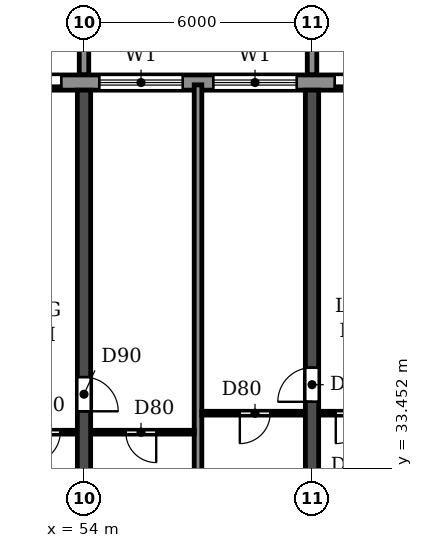
"""IFC4 building model, lengths in metres.
Left out: names, types, materials, properties, quantities, classifications, styles, units other than length and angle.
Written with IfcOpenShell. Run it as: python <this file> out.ifc"""

import sys

from ifc_helpers import new_model, si_unit, direction, frame, frame_2d, origin, place, context, subcontext, project, spatial, polyline, rectangle, outline, extrude, source, transform, mapped, element, fill, save


model = new_model("IFC4")
c1 = context("Model", 3, precision=1e-05, world=origin(), true_north=direction((0.0, 1.0)))
c2 = subcontext(c1, "Body", "Model", "MODEL_VIEW")
j1 = project(units=[si_unit("LENGTHUNIT", "METRE"), si_unit("PLANEANGLEUNIT", "RADIAN")], contexts=[c1])
p1 = place(None, origin())
s1 = spatial("IfcSite", under=j1, at=p1, CompositionType="ELEMENT")
p2 = place(p1, origin())
s2 = spatial("IfcBuilding", under=s1, at=p2, CompositionType="ELEMENT")
p3 = place(p2, frame((0.0, 0.0, 82.8)))
s3 = spatial("IfcBuildingStorey", under=s2, at=p3, CompositionType="ELEMENT", Elevation=82.8)
p4 = place(p3, frame((54.0, 30.525, 0.0), z_axis=(0.0, 0.0, 1.0), x_axis=(0.0, 1.0, 0.0)))
e1 = element("IfcWall", 1, at=p4, inside=s3, PredefinedType="SHEAR", context=c2, shape_type="SweptSolid", body=[
    extrude(rectangle(XDim=12.875, YDim=0.35, at=frame_2d((6.438, 0.0))), origin(), (0.0, 0.0, 1.0), 3.06),
])
p5 = place(p4, frame((4.425, 0.0, 0.0)))
e2 = element("IfcOpeningElement", 2, at=p5, cuts=e1, PredefinedType="OPENING", context=c2, shape_type="SweptSolid", body=[
    extrude(rectangle(XDim=0.9, YDim=2.1, at=frame_2d((0.45, 1.05))), frame((0.0, 0.185, 0.0), z_axis=(0.0, -1.0, 0.0), x_axis=(1.0, 0.0, 0.0)), (0.0, 0.0, 1.0), 0.37),
])
p6 = place(p3, frame((60.0, 30.525, 0.0), z_axis=(0.0, 0.0, 1.0), x_axis=(0.0, 1.0, 0.0)))
e3 = element("IfcWall", 3, at=p6, inside=s3, PredefinedType="SHEAR", context=c2, shape_type="SweptSolid", body=[
    extrude(rectangle(XDim=12.875, YDim=0.35, at=frame_2d((6.438, 0.0))), origin(), (0.0, 0.0, 1.0), 3.06),
])
p7 = place(p6, frame((4.675, 0.0, 0.0)))
e4 = element("IfcOpeningElement", 4, at=p7, cuts=e3, PredefinedType="OPENING", context=c2, shape_type="SweptSolid", body=[
    extrude(rectangle(XDim=0.9, YDim=2.1, at=frame_2d((0.45, 1.05))), frame((0.0, 0.185, 0.0), z_axis=(0.0, -1.0, 0.0), x_axis=(1.0, 0.0, 0.0)), (0.0, 0.0, 1.0), 0.37),
])
p8 = place(p3, frame((91.317, 43.6, 0.0), z_axis=(0.0, 0.0, 1.0), x_axis=(-1.0, 0.0, 0.0)))
e5 = element("IfcWall", 5, at=p8, inside=s3, PredefinedType="STANDARD", context=c2, shape_type="SweptSolid", body=[
    extrude(rectangle(XDim=80.634, YDim=0.4, at=frame_2d((40.317, 0.0))), origin(), (0.0, 0.0, 1.0), 3.06),
])
p9 = place(p8, frame((76.717, 0.0, 0.9)))
e6 = element("IfcOpeningElement", 6, at=p9, cuts=e5, PredefinedType="OPENING", context=c2, shape_type="SweptSolid", body=[
    extrude(rectangle(XDim=2.2, YDim=1.5, at=frame_2d((1.1, 0.75))), frame((0.0, 0.21, 0.0), z_axis=(0.0, -1.0, 0.0), x_axis=(1.0, 0.0, 0.0)), (0.0, 0.0, 1.0), 0.42),
])
p10 = place(p8, frame((73.917, 0.0, 0.0)))
e7 = element("IfcOpeningElement", 7, at=p10, cuts=e5, PredefinedType="OPENING", context=c2, shape_type="SweptSolid", body=[
    extrude(rectangle(XDim=1.8, YDim=2.4, at=frame_2d((0.9, 1.2))), frame((0.0, 0.21, 0.0), z_axis=(0.0, -1.0, 0.0), x_axis=(1.0, 0.0, 0.0)), (0.0, 0.0, 1.0), 0.42),
])
p11 = place(p8, frame((70.717, 0.0, 0.9)))
e8 = element("IfcOpeningElement", 8, at=p11, cuts=e5, PredefinedType="OPENING", context=c2, shape_type="SweptSolid", body=[
    extrude(rectangle(XDim=2.2, YDim=1.5, at=frame_2d((1.1, 0.75))), frame((0.0, 0.21, 0.0), z_axis=(0.0, -1.0, 0.0), x_axis=(1.0, 0.0, 0.0)), (0.0, 0.0, 1.0), 0.42),
])
p12 = place(p8, frame((67.717, 0.0, 0.9)))
e9 = element("IfcOpeningElement", 9, at=p12, cuts=e5, PredefinedType="OPENING", context=c2, shape_type="SweptSolid", body=[
    extrude(rectangle(XDim=2.2, YDim=1.5, at=frame_2d((1.1, 0.75))), frame((0.0, 0.21, 0.0), z_axis=(0.0, -1.0, 0.0), x_axis=(1.0, 0.0, 0.0)), (0.0, 0.0, 1.0), 0.42),
])
p13 = place(p8, frame((64.717, 0.0, 0.9)))
e10 = element("IfcOpeningElement", 10, at=p13, cuts=e5, PredefinedType="OPENING", context=c2, shape_type="SweptSolid", body=[
    extrude(rectangle(XDim=2.2, YDim=1.5, at=frame_2d((1.1, 0.75))), frame((0.0, 0.21, 0.0), z_axis=(0.0, -1.0, 0.0), x_axis=(1.0, 0.0, 0.0)), (0.0, 0.0, 1.0), 0.42),
])
p14 = place(p8, frame((61.917, 0.0, 0.0)))
e11 = element("IfcOpeningElement", 11, at=p14, cuts=e5, PredefinedType="OPENING", context=c2, shape_type="SweptSolid", body=[
    extrude(rectangle(XDim=1.8, YDim=2.4, at=frame_2d((0.9, 1.2))), frame((0.0, 0.21, 0.0), z_axis=(0.0, -1.0, 0.0), x_axis=(1.0, 0.0, 0.0)), (0.0, 0.0, 1.0), 0.42),
])
p15 = place(p8, frame((58.917, 0.0, 0.0)))
e12 = element("IfcOpeningElement", 12, at=p15, cuts=e5, PredefinedType="OPENING", context=c2, shape_type="SweptSolid", body=[
    extrude(rectangle(XDim=1.8, YDim=2.4, at=frame_2d((0.9, 1.2))), frame((0.0, 0.21, 0.0), z_axis=(0.0, -1.0, 0.0), x_axis=(1.0, 0.0, 0.0)), (0.0, 0.0, 1.0), 0.42),
])
p16 = place(p8, frame((55.717, 0.0, 0.9)))
e13 = element("IfcOpeningElement", 13, at=p16, cuts=e5, PredefinedType="OPENING", context=c2, shape_type="SweptSolid", body=[
    extrude(rectangle(XDim=2.2, YDim=1.5, at=frame_2d((1.1, 0.75))), frame((0.0, 0.21, 0.0), z_axis=(0.0, -1.0, 0.0), x_axis=(1.0, 0.0, 0.0)), (0.0, 0.0, 1.0), 0.42),
])
p17 = place(p8, frame((52.717, 0.0, 0.9)))
e14 = element("IfcOpeningElement", 14, at=p17, cuts=e5, PredefinedType="OPENING", context=c2, shape_type="SweptSolid", body=[
    extrude(rectangle(XDim=2.2, YDim=1.5, at=frame_2d((1.1, 0.75))), frame((0.0, 0.21, 0.0), z_axis=(0.0, -1.0, 0.0), x_axis=(1.0, 0.0, 0.0)), (0.0, 0.0, 1.0), 0.42),
])
p18 = place(p8, frame((49.917, 0.0, 0.0)))
e15 = element("IfcOpeningElement", 15, at=p18, cuts=e5, PredefinedType="OPENING", context=c2, shape_type="SweptSolid", body=[
    extrude(rectangle(XDim=1.8, YDim=2.4, at=frame_2d((0.9, 1.2))), frame((0.0, 0.21, 0.0), z_axis=(0.0, -1.0, 0.0), x_axis=(1.0, 0.0, 0.0)), (0.0, 0.0, 1.0), 0.42),
])
p19 = place(p8, frame((46.717, 0.0, 0.9)))
e16 = element("IfcOpeningElement", 16, at=p19, cuts=e5, PredefinedType="OPENING", context=c2, shape_type="SweptSolid", body=[
    extrude(rectangle(XDim=2.2, YDim=1.5, at=frame_2d((1.1, 0.75))), frame((0.0, 0.21, 0.0), z_axis=(0.0, -1.0, 0.0), x_axis=(1.0, 0.0, 0.0)), (0.0, 0.0, 1.0), 0.42),
])
p20 = place(p8, frame((43.717, 0.0, 0.9)))
e17 = element("IfcOpeningElement", 17, at=p20, cuts=e5, PredefinedType="OPENING", context=c2, shape_type="SweptSolid", body=[
    extrude(rectangle(XDim=2.2, YDim=1.5, at=frame_2d((1.1, 0.75))), frame((0.0, 0.21, 0.0), z_axis=(0.0, -1.0, 0.0), x_axis=(1.0, 0.0, 0.0)), (0.0, 0.0, 1.0), 0.42),
])
p21 = place(p8, frame((40.717, 0.0, 0.9)))
e18 = element("IfcOpeningElement", 18, at=p21, cuts=e5, PredefinedType="OPENING", context=c2, shape_type="SweptSolid", body=[
    extrude(rectangle(XDim=2.2, YDim=1.5, at=frame_2d((1.1, 0.75))), frame((0.0, 0.21, 0.0), z_axis=(0.0, -1.0, 0.0), x_axis=(1.0, 0.0, 0.0)), (0.0, 0.0, 1.0), 0.42),
])
p22 = place(p8, frame((37.917, 0.0, 0.0)))
e19 = element("IfcOpeningElement", 19, at=p22, cuts=e5, PredefinedType="OPENING", context=c2, shape_type="SweptSolid", body=[
    extrude(rectangle(XDim=1.8, YDim=2.4, at=frame_2d((0.9, 1.2))), frame((0.0, 0.21, 0.0), z_axis=(0.0, -1.0, 0.0), x_axis=(1.0, 0.0, 0.0)), (0.0, 0.0, 1.0), 0.42),
])
p23 = place(p8, frame((34.717, 0.0, 0.9)))
e20 = element("IfcOpeningElement", 20, at=p23, cuts=e5, PredefinedType="OPENING", context=c2, shape_type="SweptSolid", body=[
    extrude(rectangle(XDim=2.2, YDim=1.5, at=frame_2d((1.1, 0.75))), frame((0.0, 0.21, 0.0), z_axis=(0.0, -1.0, 0.0), x_axis=(1.0, 0.0, 0.0)), (0.0, 0.0, 1.0), 0.42),
])
p24 = place(p8, frame((31.717, 0.0, 0.9)))
e21 = element("IfcOpeningElement", 21, at=p24, cuts=e5, PredefinedType="OPENING", context=c2, shape_type="SweptSolid", body=[
    extrude(rectangle(XDim=2.2, YDim=1.5, at=frame_2d((1.1, 0.75))), frame((0.0, 0.21, 0.0), z_axis=(0.0, -1.0, 0.0), x_axis=(1.0, 0.0, 0.0)), (0.0, 0.0, 1.0), 0.42),
])
p25 = place(p8, frame((28.917, 0.0, 0.0)))
e22 = element("IfcOpeningElement", 22, at=p25, cuts=e5, PredefinedType="OPENING", context=c2, shape_type="SweptSolid", body=[
    extrude(rectangle(XDim=1.8, YDim=2.4, at=frame_2d((0.9, 1.2))), frame((0.0, 0.21, 0.0), z_axis=(0.0, -1.0, 0.0), x_axis=(1.0, 0.0, 0.0)), (0.0, 0.0, 1.0), 0.42),
])
p26 = place(p8, frame((25.717, 0.0, 0.9)))
e23 = element("IfcOpeningElement", 23, at=p26, cuts=e5, PredefinedType="OPENING", context=c2, shape_type="SweptSolid", body=[
    extrude(rectangle(XDim=2.2, YDim=1.5, at=frame_2d((1.1, 0.75))), frame((0.0, 0.21, 0.0), z_axis=(0.0, -1.0, 0.0), x_axis=(1.0, 0.0, 0.0)), (0.0, 0.0, 1.0), 0.42),
])
p27 = place(p8, frame((22.717, 0.0, 0.9)))
e24 = element("IfcOpeningElement", 24, at=p27, cuts=e5, PredefinedType="OPENING", context=c2, shape_type="SweptSolid", body=[
    extrude(rectangle(XDim=2.2, YDim=1.5, at=frame_2d((1.1, 0.75))), frame((0.0, 0.21, 0.0), z_axis=(0.0, -1.0, 0.0), x_axis=(1.0, 0.0, 0.0)), (0.0, 0.0, 1.0), 0.42),
])
p28 = place(p8, frame((19.717, 0.0, 0.9)))
e25 = element("IfcOpeningElement", 25, at=p28, cuts=e5, PredefinedType="OPENING", context=c2, shape_type="SweptSolid", body=[
    extrude(rectangle(XDim=2.2, YDim=1.5, at=frame_2d((1.1, 0.75))), frame((0.0, 0.21, 0.0), z_axis=(0.0, -1.0, 0.0), x_axis=(1.0, 0.0, 0.0)), (0.0, 0.0, 1.0), 0.42),
])
p29 = place(p8, frame((16.717, 0.0, 0.9)))
e26 = element("IfcOpeningElement", 26, at=p29, cuts=e5, PredefinedType="OPENING", context=c2, shape_type="SweptSolid", body=[
    extrude(rectangle(XDim=2.2, YDim=1.5, at=frame_2d((1.1, 0.75))), frame((0.0, 0.21, 0.0), z_axis=(0.0, -1.0, 0.0), x_axis=(1.0, 0.0, 0.0)), (0.0, 0.0, 1.0), 0.42),
])
p30 = place(p8, frame((13.917, 0.0, 0.0)))
e27 = element("IfcOpeningElement", 27, at=p30, cuts=e5, PredefinedType="OPENING", context=c2, shape_type="SweptSolid", body=[
    extrude(rectangle(XDim=1.8, YDim=2.4, at=frame_2d((0.9, 1.2))), frame((0.0, 0.21, 0.0), z_axis=(0.0, -1.0, 0.0), x_axis=(1.0, 0.0, 0.0)), (0.0, 0.0, 1.0), 0.42),
])
p31 = place(p8, frame((10.717, 0.0, 0.9)))
e28 = element("IfcOpeningElement", 28, at=p31, cuts=e5, PredefinedType="OPENING", context=c2, shape_type="SweptSolid", body=[
    extrude(rectangle(XDim=2.2, YDim=1.5, at=frame_2d((1.1, 0.75))), frame((0.0, 0.21, 0.0), z_axis=(0.0, -1.0, 0.0), x_axis=(1.0, 0.0, 0.0)), (0.0, 0.0, 1.0), 0.42),
])
p32 = place(p8, frame((7.717, 0.0, 0.9)))
e29 = element("IfcOpeningElement", 29, at=p32, cuts=e5, PredefinedType="OPENING", context=c2, shape_type="SweptSolid", body=[
    extrude(rectangle(XDim=2.2, YDim=1.5, at=frame_2d((1.1, 0.75))), frame((0.0, 0.21, 0.0), z_axis=(0.0, -1.0, 0.0), x_axis=(1.0, 0.0, 0.0)), (0.0, 0.0, 1.0), 0.42),
])
p33 = place(p8, frame((4.917, 0.0, 0.0)))
e30 = element("IfcOpeningElement", 30, at=p33, cuts=e5, PredefinedType="OPENING", context=c2, shape_type="SweptSolid", body=[
    extrude(rectangle(XDim=1.8, YDim=2.4, at=frame_2d((0.9, 1.2))), frame((0.0, 0.21, 0.0), z_axis=(0.0, -1.0, 0.0), x_axis=(1.0, 0.0, 0.0)), (0.0, 0.0, 1.0), 0.42),
])
p34 = place(p8, frame((1.717, 0.0, 0.9)))
e31 = element("IfcOpeningElement", 31, at=p34, cuts=e5, PredefinedType="OPENING", context=c2, shape_type="SweptSolid", body=[
    extrude(rectangle(XDim=2.2, YDim=1.5, at=frame_2d((1.1, 0.75))), frame((0.0, 0.21, 0.0), z_axis=(0.0, -1.0, 0.0), x_axis=(1.0, 0.0, 0.0)), (0.0, 0.0, 1.0), 0.42),
])
m1 = source(origin(), c2, "Body", "SweptSolid", [
    extrude(outline(polyline([(0.0, 0.0), (0.25, 0.0), (0.25, 3.1), (0.0, 3.1), (0.0, 0.0)])), origin(), (0.0, 0.0, 1.0), 3.1),
])
for number, where in (
    (32, (53.875, 43.8, 0.0)),
    (33, (59.875, 43.8, 0.0)),
):
    element("IfcWall", number, at=place(p3, frame(where)), inside=s3, PredefinedType="STANDARD", context=c2, shape_type="MappedRepresentation", body=[
        mapped(m1, transform((0.0, 0.0, 0.0))),
    ])
p35 = place(p3, frame((57.0, 30.535, 0.0), z_axis=(0.0, 0.0, 1.0), x_axis=(0.0, 1.0, 0.0)))
e34 = element("IfcWall", 34, at=p35, inside=s3, PredefinedType="PARTITIONING", context=c2, shape_type="SweptSolid", body=[
    extrude(rectangle(XDim=13.005, YDim=0.2, at=frame_2d((6.502, 0.0))), origin(), (0.0, 0.0, 1.0), 3.06),
])
p36 = place(p3, frame((51.9, 34.4, 0.0), z_axis=(0.0, 0.0, 1.0), x_axis=(1.0, 0.0, 0.0)))
e35 = element("IfcWall", 35, at=p36, inside=s3, PredefinedType="PARTITIONING", context=c2, shape_type="SweptSolid", body=[
    extrude(rectangle(XDim=1.915, YDim=0.1, at=frame_2d((0.958, 0.0))), origin(), (0.0, 0.0, 1.0), 3.06),
])
p37 = place(p36, frame((0.675, 0.0, 0.0)))
e36 = element("IfcOpeningElement", 36, at=p37, cuts=e35, PredefinedType="OPENING", context=c2, shape_type="SweptSolid", body=[
    extrude(rectangle(XDim=0.8, YDim=2.1, at=frame_2d((0.4, 1.05))), frame((0.0, 0.06, 0.0), z_axis=(0.0, -1.0, 0.0), x_axis=(1.0, 0.0, 0.0)), (0.0, 0.0, 1.0), 0.12),
])
p38 = place(p3, frame((54.185, 34.4, 0.0), z_axis=(0.0, 0.0, 1.0), x_axis=(1.0, 0.0, 0.0)))
e37 = element("IfcWall", 37, at=p38, inside=s3, PredefinedType="PARTITIONING", context=c2, shape_type="SweptSolid", body=[
    extrude(rectangle(XDim=2.715, YDim=0.1, at=frame_2d((1.357, 0.0))), origin(), (0.0, 0.0, 1.0), 3.06),
])
p39 = place(p38, frame((0.915, 0.0, 0.0)))
e38 = element("IfcOpeningElement", 38, at=p39, cuts=e37, PredefinedType="OPENING", context=c2, shape_type="SweptSolid", body=[
    extrude(rectangle(XDim=0.8, YDim=2.1, at=frame_2d((0.4, 1.05))), frame((0.0, 0.06, 0.0), z_axis=(0.0, -1.0, 0.0), x_axis=(1.0, 0.0, 0.0)), (0.0, 0.0, 1.0), 0.12),
])
p40 = place(p3, frame((57.1, 34.9, 0.0), z_axis=(0.0, 0.0, 1.0), x_axis=(1.0, 0.0, 0.0)))
e39 = element("IfcWall", 39, at=p40, inside=s3, PredefinedType="PARTITIONING", context=c2, shape_type="SweptSolid", body=[
    extrude(rectangle(XDim=2.715, YDim=0.1, at=frame_2d((1.357, 0.0))), origin(), (0.0, 0.0, 1.0), 3.06),
])
p41 = place(p40, frame((1.0, 0.0, 0.0)))
e40 = element("IfcOpeningElement", 40, at=p41, cuts=e39, PredefinedType="OPENING", context=c2, shape_type="SweptSolid", body=[
    extrude(rectangle(XDim=0.8, YDim=2.1, at=frame_2d((0.4, 1.05))), frame((0.0, 0.06, 0.0), z_axis=(0.0, -1.0, 0.0), x_axis=(1.0, 0.0, 0.0)), (0.0, 0.0, 1.0), 0.12),
])
p42 = place(p3, frame((60.185, 34.9, 0.0), z_axis=(0.0, 0.0, 1.0), x_axis=(1.0, 0.0, 0.0)))
e41 = element("IfcWall", 41, at=p42, inside=s3, PredefinedType="PARTITIONING", context=c2, shape_type="SweptSolid", body=[
    extrude(rectangle(XDim=1.915, YDim=0.1, at=frame_2d((0.958, 0.0))), origin(), (0.0, 0.0, 1.0), 3.06),
])
p43 = place(p42, frame((0.44, 0.0, 0.0)))
e42 = element("IfcOpeningElement", 42, at=p43, cuts=e41, PredefinedType="OPENING", context=c2, shape_type="SweptSolid", body=[
    extrude(rectangle(XDim=0.8, YDim=2.1, at=frame_2d((0.4, 1.05))), frame((0.0, 0.06, 0.0), z_axis=(0.0, -1.0, 0.0), x_axis=(1.0, 0.0, 0.0)), (0.0, 0.0, 1.0), 0.12),
])
p44 = place(p22, origin())
e43 = element("IfcDoor", 43, at=p44, inside=s3, OperationType="DOUBLE_DOOR_SLIDING", PredefinedType="DOOR", context=c2, shape_type="SweptSolid", body=[
    extrude(rectangle(XDim=1.8, YDim=2.4, at=frame_2d((0.9, 1.2))), frame((0.0, 0.025, 0.0), z_axis=(0.0, -1.0, 0.0), x_axis=(1.0, 0.0, 0.0)), (0.0, 0.0, 1.0), 0.05),
])
fill(e19, e43)
p45 = place(p23, origin())
e44 = element("IfcWindow", 44, at=p45, inside=s3, PartitioningType="DOUBLE_PANEL_HORIZONTAL", PredefinedType="WINDOW", context=c2, shape_type="SweptSolid", body=[
    extrude(rectangle(XDim=2.2, YDim=1.5, at=frame_2d((1.1, 0.75))), frame((0.0, 0.03, 0.0), z_axis=(0.0, -1.0, 0.0), x_axis=(1.0, 0.0, 0.0)), (0.0, 0.0, 1.0), 0.06),
])
fill(e20, e44)
p46 = place(p24, origin())
e45 = element("IfcWindow", 45, at=p46, inside=s3, PartitioningType="DOUBLE_PANEL_HORIZONTAL", PredefinedType="WINDOW", context=c2, shape_type="SweptSolid", body=[
    extrude(rectangle(XDim=2.2, YDim=1.5, at=frame_2d((1.1, 0.75))), frame((0.0, 0.03, 0.0), z_axis=(0.0, -1.0, 0.0), x_axis=(1.0, 0.0, 0.0)), (0.0, 0.0, 1.0), 0.06),
])
fill(e21, e45)
p47 = place(p25, origin())
e46 = element("IfcDoor", 46, at=p47, inside=s3, OperationType="DOUBLE_DOOR_SLIDING", PredefinedType="DOOR", context=c2, shape_type="SweptSolid", body=[
    extrude(rectangle(XDim=1.8, YDim=2.4, at=frame_2d((0.9, 1.2))), frame((0.0, 0.025, 0.0), z_axis=(0.0, -1.0, 0.0), x_axis=(1.0, 0.0, 0.0)), (0.0, 0.0, 1.0), 0.05),
])
fill(e22, e46)
p48 = place(p39, frame((0.8, 0.0, 0.0), z_axis=(0.0, 0.0, 1.0), x_axis=(-1.0, 0.0, 0.0)))
e47 = element("IfcDoor", 47, at=p48, inside=s3, OperationType="SINGLE_SWING_LEFT", PredefinedType="DOOR", context=c2, shape_type="SweptSolid", body=[
    extrude(rectangle(XDim=0.8, YDim=2.1, at=frame_2d((0.4, 1.05))), frame((0.0, 0.025, 0.0), z_axis=(0.0, -1.0, 0.0), x_axis=(1.0, 0.0, 0.0)), (0.0, 0.0, 1.0), 0.05),
])
fill(e38, e47)
p49 = place(p37, frame((0.8, 0.0, 0.0), z_axis=(0.0, 0.0, 1.0), x_axis=(-1.0, 0.0, 0.0)))
e48 = element("IfcDoor", 48, at=p49, inside=s3, OperationType="SINGLE_SWING_RIGHT", PredefinedType="DOOR", context=c2, shape_type="SweptSolid", body=[
    extrude(rectangle(XDim=0.8, YDim=2.1, at=frame_2d((0.4, 1.05))), frame((0.0, 0.025, 0.0), z_axis=(0.0, -1.0, 0.0), x_axis=(1.0, 0.0, 0.0)), (0.0, 0.0, 1.0), 0.05),
])
fill(e36, e48)
p50 = place(p5, frame((0.9, 0.0, 0.0), z_axis=(0.0, 0.0, 1.0), x_axis=(-1.0, 0.0, 0.0)))
e49 = element("IfcDoor", 49, at=p50, inside=s3, OperationType="SINGLE_SWING_RIGHT", PredefinedType="DOOR", context=c2, shape_type="SweptSolid", body=[
    extrude(rectangle(XDim=0.9, YDim=2.1, at=frame_2d((0.45, 1.05))), frame((0.0, 0.025, 0.0), z_axis=(0.0, -1.0, 0.0), x_axis=(1.0, 0.0, 0.0)), (0.0, 0.0, 1.0), 0.05),
])
fill(e2, e49)
p51 = place(p41, frame((0.8, 0.0, 0.0), z_axis=(0.0, 0.0, 1.0), x_axis=(-1.0, 0.0, 0.0)))
e50 = element("IfcDoor", 50, at=p51, inside=s3, OperationType="SINGLE_SWING_RIGHT", PredefinedType="DOOR", context=c2, shape_type="SweptSolid", body=[
    extrude(rectangle(XDim=0.8, YDim=2.1, at=frame_2d((0.4, 1.05))), frame((0.0, 0.025, 0.0), z_axis=(0.0, -1.0, 0.0), x_axis=(1.0, 0.0, 0.0)), (0.0, 0.0, 1.0), 0.05),
])
fill(e40, e50)
p52 = place(p7, origin())
e51 = element("IfcDoor", 51, at=p52, inside=s3, OperationType="SINGLE_SWING_LEFT", PredefinedType="DOOR", context=c2, shape_type="SweptSolid", body=[
    extrude(rectangle(XDim=0.9, YDim=2.1, at=frame_2d((0.45, 1.05))), frame((0.0, 0.025, 0.0), z_axis=(0.0, -1.0, 0.0), x_axis=(1.0, 0.0, 0.0)), (0.0, 0.0, 1.0), 0.05),
])
fill(e4, e51)
p53 = place(p43, frame((0.8, 0.0, 0.0), z_axis=(0.0, 0.0, 1.0), x_axis=(-1.0, 0.0, 0.0)))
e52 = element("IfcDoor", 52, at=p53, inside=s3, OperationType="SINGLE_SWING_RIGHT", PredefinedType="DOOR", context=c2, shape_type="SweptSolid", body=[
    extrude(rectangle(XDim=0.8, YDim=2.1, at=frame_2d((0.4, 1.05))), frame((0.0, 0.025, 0.0), z_axis=(0.0, -1.0, 0.0), x_axis=(1.0, 0.0, 0.0)), (0.0, 0.0, 1.0), 0.05),
])
fill(e42, e52)
save(model, sys.argv[1])
